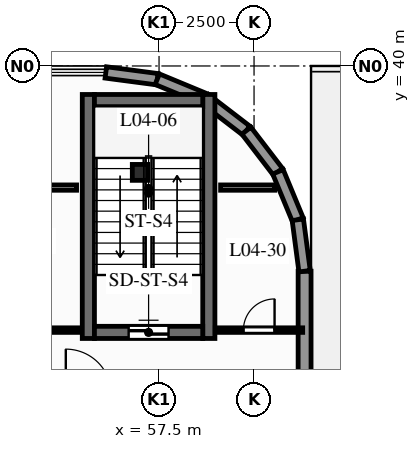
"""IFC4 building model, lengths in metres.
Left out: names, types, materials, properties, quantities, classifications, styles, units other than length and angle.
Written with IfcOpenShell. Run it as: python <this file> out.ifc"""

import sys

from ifc_helpers import new_model, si_unit, direction, frame, frame_2d, origin, origin_2d, place, context, subcontext, project, spatial, rectangle, i_section, extrude, element, fill, save


model = new_model("IFC4")
c1 = context("Model", 3, precision=1e-05, world=origin(), true_north=direction((0.0, 1.0)))
c2 = subcontext(c1, "Body", "Model", "MODEL_VIEW")
j1 = project(units=[si_unit("LENGTHUNIT", "METRE"), si_unit("PLANEANGLEUNIT", "RADIAN")], contexts=[c1])
p1 = place(None, origin())
s1 = spatial("IfcSite", under=j1, at=p1, CompositionType="ELEMENT")
p2 = place(p1, origin())
s2 = spatial("IfcBuilding", under=s1, at=p2, CompositionType="ELEMENT")
p3 = place(p2, frame((0.0, 0.0, 18.0)))
s3 = spatial("IfcBuildingStorey", under=s2, at=p3, CompositionType="ELEMENT", Elevation=18.0)
p4 = place(p3, frame((57.0, 37.2, 0.0), z_axis=(0.0, 0.0, 1.0), x_axis=(1.0, 0.0, 0.0)))
e1 = element("IfcColumn", 1, at=p4, inside=s3, PredefinedType="COLUMN", context=c2, shape_type="SweptSolid", body=[
    extrude(i_section(OverallWidth=0.407, OverallDepth=0.419, WebThickness=0.031, FlangeThickness=0.049, FilletRadius=0.015, at=origin_2d()), origin(), (0.0, 0.0, 1.0), 4.5),
])
p5 = place(p3, frame((61.33, -1.83, 0.0), z_axis=(0.0, 0.0, 1.0), x_axis=(0.0, 1.0, 0.0)))
e2 = element("IfcWall", 2, at=p5, inside=s3, PredefinedType="STANDARD", context=c2, shape_type="SweptSolid", body=[
    extrude(rectangle(XDim=36.43, YDim=0.34, at=frame_2d((18.215, 0.0))), origin(), (0.0, 0.0, 1.0), 4.22),
])
p6 = place(p5, frame((6.33, 0.0, 0.9)))
e3 = element("IfcOpeningElement", 3, at=p6, cuts=e2, PredefinedType="OPENING", context=c2, shape_type="SweptSolid", body=[
    extrude(rectangle(XDim=2.1, YDim=2.05, at=frame_2d((1.05, 1.025))), frame((0.0, 0.18, 0.0), z_axis=(0.0, -1.0, 0.0), x_axis=(1.0, 0.0, 0.0)), (0.0, 0.0, 1.0), 0.36),
])
p7 = place(p5, frame((15.33, 0.0, 0.9)))
e4 = element("IfcOpeningElement", 4, at=p7, cuts=e2, PredefinedType="OPENING", context=c2, shape_type="SweptSolid", body=[
    extrude(rectangle(XDim=2.1, YDim=2.05, at=frame_2d((1.05, 1.025))), frame((0.0, 0.18, 0.0), z_axis=(0.0, -1.0, 0.0), x_axis=(1.0, 0.0, 0.0)), (0.0, 0.0, 1.0), 0.36),
])
p8 = place(p5, frame((28.63, 0.0, 0.9)))
e5 = element("IfcOpeningElement", 5, at=p8, cuts=e2, PredefinedType="OPENING", context=c2, shape_type="SweptSolid", body=[
    extrude(rectangle(XDim=2.1, YDim=2.05, at=frame_2d((1.05, 1.025))), frame((0.0, 0.18, 0.0), z_axis=(0.0, -1.0, 0.0), x_axis=(1.0, 0.0, 0.0)), (0.0, 0.0, 1.0), 0.36),
])
p9 = place(p5, frame((20.33, 0.0, 0.0)))
e6 = element("IfcOpeningElement", 6, at=p9, cuts=e2, PredefinedType="OPENING", context=c2, shape_type="SweptSolid", body=[
    extrude(rectangle(XDim=1.7, YDim=2.3, at=frame_2d((0.85, 1.15))), frame((0.0, 0.18, 0.0), z_axis=(0.0, -1.0, 0.0), x_axis=(1.0, 0.0, 0.0)), (0.0, 0.0, 1.0), 0.36),
])
p10 = place(p3, frame((56.1, 39.83, 0.0), z_axis=(0.0, 0.0, 1.0), x_axis=(0.991442117533, -0.13054703207, 0.0)))
e7 = element("IfcWall", 7, at=p10, inside=s3, PredefinedType="STANDARD", context=c2, shape_type="SweptSolid", body=[
    extrude(rectangle(XDim=1.365, YDim=0.3, at=frame_2d((0.683, 0.0))), origin(), (0.0, 0.0, 1.0), 4.22),
])
p11 = place(p3, frame((57.454, 39.652, 0.0), z_axis=(0.0, 0.0, 1.0), x_axis=(0.923894797396, -0.382646577594, 0.0)))
e8 = element("IfcWall", 8, at=p11, inside=s3, PredefinedType="STANDARD", context=c2, shape_type="SweptSolid", body=[
    extrude(rectangle(XDim=1.365, YDim=0.3, at=frame_2d((0.683, 0.0))), origin(), (0.0, 0.0, 1.0), 4.22),
])
for number, where, z_axis, x_axis in (
    (9, (58.715, 39.129, 0.0), (0.0, 0.0, 1.0), (0.793, -0.609, 0.0)),
    (10, (59.798, 38.298, 0.0), (0.0, 0.0, 1.0), (0.609, -0.793, 0.0)),
):
    element("IfcWall", number, at=place(p3, frame(where, z_axis=z_axis, x_axis=x_axis)), inside=s3, PredefinedType="STANDARD", context=c2, shape_type="SweptSolid", body=[
        extrude(rectangle(XDim=1.365, YDim=0.3, at=frame_2d((0.683, 0.0))), origin(), (0.0, 0.0, 1.0), 4.22),
    ])
p12 = place(p3, frame((60.629, 37.215, 0.0), z_axis=(0.0, 0.0, 1.0), x_axis=(0.382646577594, -0.923894797396, 0.0)))
e11 = element("IfcWall", 11, at=p12, inside=s3, PredefinedType="STANDARD", context=c2, shape_type="SweptSolid", body=[
    extrude(rectangle(XDim=1.365, YDim=0.3, at=frame_2d((0.683, 0.0))), origin(), (0.0, 0.0, 1.0), 4.22),
])
p13 = place(p3, frame((61.152, 35.954, 0.0), z_axis=(0.0, 0.0, 1.0), x_axis=(0.13054703207, -0.991442117533, 0.0)))
e12 = element("IfcWall", 12, at=p13, inside=s3, PredefinedType="STANDARD", context=c2, shape_type="SweptSolid", body=[
    extrude(rectangle(XDim=1.365, YDim=0.3, at=frame_2d((0.683, 0.0))), origin(), (0.0, 0.0, 1.0), 4.22),
])
for number, where, z_axis, x_axis in (
    (13, (55.64, 32.83, 0.0), (0.0, 0.0, 1.0), (0.0, 1.0, 0.0)),
    (14, (58.81, 32.83, 0.0), (0.0, 0.0, 1.0), (0.0, 1.0, 0.0)),
):
    element("IfcWall", number, at=place(p3, frame(where, z_axis=z_axis, x_axis=x_axis)), inside=s3, PredefinedType="SHEAR", context=c2, shape_type="SweptSolid", body=[
        extrude(rectangle(XDim=6.42, YDim=0.32, at=frame_2d((3.21, 0.0))), origin(), (0.0, 0.0, 1.0), 4.22),
    ])
p14 = place(p3, frame((55.8, 32.99, 0.0), z_axis=(0.0, 0.0, 1.0), x_axis=(1.0, 0.0, 0.0)))
e15 = element("IfcWall", 15, at=p14, inside=s3, PredefinedType="SHEAR", context=c2, shape_type="SweptSolid", body=[
    extrude(rectangle(XDim=2.85, YDim=0.32, at=frame_2d((1.425, 0.0))), origin(), (0.0, 0.0, 1.0), 4.22),
])
p15 = place(p14, frame((0.9, 0.0, 0.0)))
e16 = element("IfcOpeningElement", 16, at=p15, cuts=e15, PredefinedType="OPENING", context=c2, shape_type="SweptSolid", body=[
    extrude(rectangle(XDim=1.05, YDim=2.06, at=frame_2d((0.525, 1.03))), frame((0.0, 0.17, 0.0), z_axis=(0.0, -1.0, 0.0), x_axis=(1.0, 0.0, 0.0)), (0.0, 0.0, 1.0), 0.34),
])
p16 = place(p3, frame((58.65, 39.09, 0.0), z_axis=(0.0, 0.0, 1.0), x_axis=(-1.0, 0.0, 0.0)))
e17 = element("IfcWall", 17, at=p16, inside=s3, PredefinedType="SHEAR", context=c2, shape_type="SweptSolid", body=[
    extrude(rectangle(XDim=2.85, YDim=0.32, at=frame_2d((1.425, 0.0))), origin(), (0.0, 0.0, 1.0), 4.22),
])
p17 = place(p3, frame((52.443, 33.05, 0.0), z_axis=(0.0, 0.0, 1.0), x_axis=(1.0, 0.0, 0.0)))
e18 = element("IfcWall", 18, at=p17, inside=s3, PredefinedType="PARTITIONING", context=c2, shape_type="SweptSolid", body=[
    extrude(rectangle(XDim=3.019, YDim=0.12, at=frame_2d((1.509, 0.0))), origin(), (0.0, 0.0, 1.0), 4.22),
])
p18 = place(p17, frame((0.984, 0.0, 0.0)))
e19 = element("IfcOpeningElement", 19, at=p18, cuts=e18, PredefinedType="OPENING", context=c2, shape_type="SweptSolid", body=[
    extrude(rectangle(XDim=1.05, YDim=2.06, at=frame_2d((0.525, 1.03))), frame((0.0, 0.07, 0.0), z_axis=(0.0, -1.0, 0.0), x_axis=(1.0, 0.0, 0.0)), (0.0, 0.0, 1.0), 0.14),
])
p19 = place(p3, frame((58.98, 33.05, 0.0), z_axis=(0.0, 0.0, 1.0), x_axis=(1.0, 0.0, 0.0)))
e20 = element("IfcWall", 20, at=p19, inside=s3, PredefinedType="PARTITIONING", context=c2, shape_type="SweptSolid", body=[
    extrude(rectangle(XDim=2.3, YDim=0.12, at=frame_2d((1.15, 0.0))), origin(), (0.0, 0.0, 1.0), 4.22),
])
p20 = place(p19, frame((0.74, 0.0, 0.0)))
e21 = element("IfcOpeningElement", 21, at=p20, cuts=e20, PredefinedType="OPENING", context=c2, shape_type="SweptSolid", body=[
    extrude(rectangle(XDim=0.82, YDim=2.02, at=frame_2d((0.41, 1.01))), frame((0.0, 0.07, 0.0), z_axis=(0.0, -1.0, 0.0), x_axis=(1.0, 0.0, 0.0)), (0.0, 0.0, 1.0), 0.14),
])
p21 = place(p3, frame((52.69, 36.8, 0.0), z_axis=(0.0, 0.0, 1.0), x_axis=(1.0, 0.0, 0.0)))
e22 = element("IfcWall", 22, at=p21, inside=s3, PredefinedType="PARTITIONING", context=c2, shape_type="SweptSolid", body=[
    extrude(rectangle(XDim=2.64, YDim=0.14, at=frame_2d((1.32, 0.0))), origin(), (0.0, 0.0, 1.0), 4.22),
])
p22 = place(p3, frame((59.12, 36.8, 0.0), z_axis=(0.0, 0.0, 1.0), x_axis=(1.0, 0.0, 0.0)))
e23 = element("IfcWall", 23, at=p22, inside=s3, PredefinedType="PARTITIONING", context=c2, shape_type="SweptSolid", body=[
    extrude(rectangle(XDim=1.421, YDim=0.14, at=frame_2d((0.711, 0.0))), origin(), (0.0, 0.0, 1.0), 4.22),
])
p23 = place(p15, origin())
e24 = element("IfcDoor", 24, at=p23, inside=s3, OperationType="SINGLE_SWING_LEFT", PredefinedType="DOOR", context=c2, shape_type="SweptSolid", body=[
    extrude(rectangle(XDim=1.05, YDim=2.06, at=frame_2d((0.525, 1.03))), frame((0.0, 0.025, 0.0), z_axis=(0.0, -1.0, 0.0), x_axis=(1.0, 0.0, 0.0)), (0.0, 0.0, 1.0), 0.05),
])
fill(e16, e24)
p24 = place(p20, origin())
e25 = element("IfcDoor", 25, at=p24, inside=s3, OperationType="SINGLE_SWING_RIGHT", PredefinedType="DOOR", context=c2, shape_type="SweptSolid", body=[
    extrude(rectangle(XDim=0.82, YDim=2.02, at=frame_2d((0.41, 1.01))), frame((0.0, 0.025, 0.0), z_axis=(0.0, -1.0, 0.0), x_axis=(1.0, 0.0, 0.0)), (0.0, 0.0, 1.0), 0.05),
])
fill(e21, e25)
save(model, sys.argv[1])
